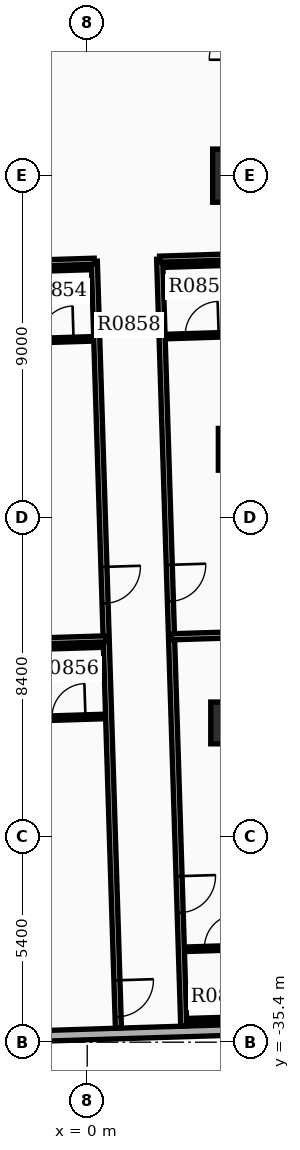
"""IFC4 building model, lengths in metres.
Left out: names, types, materials, properties, quantities, classifications, styles, units other than length and angle.
Written with IfcOpenShell. Run it as: python <this file> out.ifc"""

import sys

from ifc_helpers import new_model, si_unit, direction, frame, frame_2d, origin, origin_2d, place, context, subcontext, project, spatial, rectangle, extrude, element, fill, save


model = new_model("IFC4")
c1 = context("Model", 3, precision=1e-05, world=origin(), true_north=direction((0.0, 1.0)))
c2 = subcontext(c1, "Body", "Model", "MODEL_VIEW")
j1 = project(units=[si_unit("LENGTHUNIT", "METRE"), si_unit("PLANEANGLEUNIT", "RADIAN")], contexts=[c1])
p1 = place(None, origin())
s1 = spatial("IfcSite", under=j1, at=p1, CompositionType="ELEMENT")
p2 = place(p1, origin())
s2 = spatial("IfcBuilding", under=s1, at=p2, CompositionType="ELEMENT")
p3 = place(p2, frame((0.0, 0.0, 56.1)))
s3 = spatial("IfcBuildingStorey", under=s2, at=p3, CompositionType="ELEMENT", Elevation=56.1)
p4 = place(p3, frame((4.0, -12.6, 0.0), z_axis=(0.0, 0.0, 1.0), x_axis=(1.0, 0.0, 0.0)))
e1 = element("IfcColumn", 1, at=p4, inside=s3, PredefinedType="COLUMN", context=c2, shape_type="SweptSolid", body=[
    extrude(rectangle(XDim=1.4, YDim=1.4, at=origin_2d()), origin(), (0.0, 0.0, 1.0), 3.9),
])
for number, where, z_axis, x_axis in (
    (2, (4.0, -19.8, 0.0), (0.0, 0.0, 1.0), (1.0, 0.0, 0.0)),
    (3, (3.8, -27.0, 0.0), (0.0, 0.0, 1.0), (1.0, 0.0, 0.0)),
):
    element("IfcColumn", number, at=place(p3, frame(where, z_axis=z_axis, x_axis=x_axis)), inside=s3, PredefinedType="COLUMN", context=c2, shape_type="SweptSolid", body=[
        extrude(rectangle(XDim=1.1, YDim=1.1, at=origin_2d()), origin(), (0.0, 0.0, 1.0), 3.9),
    ])
p5 = place(p3, frame((-5.752, -35.378, 0.0), z_axis=(0.0, 0.0, 1.0), x_axis=(0.999506679556, 0.031406966164, 0.0)))
e4 = element("IfcWall", 4, at=p5, inside=s3, PredefinedType="STANDARD", context=c2, shape_type="SweptSolid", body=[
    extrude(rectangle(XDim=13.72, YDim=0.28, at=frame_2d((6.86, 0.0))), origin(), (0.0, 0.0, 1.0), 2.91),
])
p6 = place(p5, frame((0.85, 0.0, 0.85)))
e5 = element("IfcOpeningElement", 5, at=p6, cuts=e4, PredefinedType="OPENING", context=c2, shape_type="SweptSolid", body=[
    extrude(rectangle(XDim=1.0, YDim=1.5, at=frame_2d((0.5, 0.75))), frame((0.0, 0.15, 0.0), z_axis=(0.0, -1.0, 0.0), x_axis=(1.0, 0.0, 0.0)), (0.0, 0.0, 1.0), 0.3),
])
p7 = place(p3, frame((1.906, -14.797, 0.0), z_axis=(0.0, 0.0, 1.0), x_axis=(0.031415650687, -0.999506406629, 0.0)))
e6 = element("IfcWall", 6, at=p7, inside=s3, PredefinedType="PARTITIONING", context=c2, shape_type="SweptSolid", body=[
    extrude(rectangle(XDim=20.182, YDim=0.16, at=frame_2d((10.091, 0.0))), origin(), (0.0, 0.0, 1.0), 2.9),
])
p8 = place(p7, frame((8.047, 0.0, 0.0)))
e7 = element("IfcOpeningElement", 7, at=p8, cuts=e6, PredefinedType="OPENING", context=c2, shape_type="SweptSolid", body=[
    extrude(rectangle(XDim=0.96, YDim=2.15, at=frame_2d((0.48, 1.075))), frame((0.0, 0.09, 0.0), z_axis=(0.0, -1.0, 0.0), x_axis=(1.0, 0.0, 0.0)), (0.0, 0.0, 1.0), 0.18),
])
p9 = place(p7, frame((16.243, 0.0, 0.0)))
e8 = element("IfcOpeningElement", 8, at=p9, cuts=e6, PredefinedType="OPENING", context=c2, shape_type="SweptSolid", body=[
    extrude(rectangle(XDim=0.96, YDim=2.15, at=frame_2d((0.48, 1.075))), frame((0.0, 0.09, 0.0), z_axis=(0.0, -1.0, 0.0), x_axis=(1.0, 0.0, 0.0)), (0.0, 0.0, 1.0), 0.18),
])
p10 = place(p3, frame((1.906, -14.797, 0.0), z_axis=(0.0, 0.0, 1.0), x_axis=(0.99950701053, 0.031396431354, 0.0)))
e9 = element("IfcWall", 9, at=p10, inside=s3, PredefinedType="PARTITIONING", context=c2, shape_type="SweptSolid", body=[
    extrude(rectangle(XDim=5.28, YDim=0.16, at=frame_2d((2.64, 0.0))), origin(), (0.0, 0.0, 1.0), 2.9),
])
p11 = place(p3, frame((2.218, -24.733, 0.0), z_axis=(0.0, 0.0, 1.0), x_axis=(0.999506957349, 0.031398124315, 0.0)))
e10 = element("IfcWall", 10, at=p11, inside=s3, PredefinedType="PARTITIONING", context=c2, shape_type="SweptSolid", body=[
    extrude(rectangle(XDim=5.132, YDim=0.16, at=frame_2d((2.566, 0.0))), origin(), (0.0, 0.0, 1.0), 2.9),
])
p12 = place(p3, frame((2.11, -16.832, 0.0), z_axis=(0.0, 0.0, 1.0), x_axis=(0.999507353951, 0.031385496622, 0.0)))
e11 = element("IfcWall", 11, at=p12, inside=s3, PredefinedType="PARTITIONING", context=c2, shape_type="SweptSolid", body=[
    extrude(rectangle(XDim=1.82, YDim=0.12, at=frame_2d((0.91, 0.0))), origin(), (0.0, 0.0, 1.0), 2.9),
])
p13 = place(p12, frame((0.47, 0.0, 0.0)))
e12 = element("IfcOpeningElement", 12, at=p13, cuts=e11, PredefinedType="OPENING", context=c2, shape_type="SweptSolid", body=[
    extrude(rectangle(XDim=0.88, YDim=2.1, at=frame_2d((0.44, 1.05))), frame((0.0, 0.07, 0.0), z_axis=(0.0, -1.0, 0.0), x_axis=(1.0, 0.0, 0.0)), (0.0, 0.0, 1.0), 0.14),
])
p14 = place(p3, frame((2.051, -14.953, 0.0), z_axis=(0.0, 0.0, 1.0), x_axis=(0.999507221803, 0.031389704724, 0.0)))
e13 = element("IfcWall", 13, at=p14, inside=s3, PredefinedType="PARTITIONING", context=c2, shape_type="SweptSolid", body=[
    extrude(rectangle(XDim=1.82, YDim=0.12, at=frame_2d((0.91, 0.0))), origin(), (0.0, 0.0, 1.0), 2.9),
])
p15 = place(p3, frame((2.616, -32.954, 0.0), z_axis=(0.0, 0.0, 1.0), x_axis=(0.999507221803, 0.031389704724, 0.0)))
e14 = element("IfcWall", 14, at=p15, inside=s3, PredefinedType="PARTITIONING", context=c2, shape_type="SweptSolid", body=[
    extrude(rectangle(XDim=1.82, YDim=0.12, at=frame_2d((0.91, 0.0))), origin(), (0.0, 0.0, 1.0), 2.9),
])
p16 = place(p15, frame((0.47, 0.0, 0.0)))
e15 = element("IfcOpeningElement", 15, at=p16, cuts=e14, PredefinedType="OPENING", context=c2, shape_type="SweptSolid", body=[
    extrude(rectangle(XDim=0.88, YDim=2.1, at=frame_2d((0.44, 1.05))), frame((0.0, 0.07, 0.0), z_axis=(0.0, -1.0, 0.0), x_axis=(1.0, 0.0, 0.0)), (0.0, 0.0, 1.0), 0.14),
])
p17 = place(p3, frame((2.676, -34.833, 0.0), z_axis=(0.0, 0.0, 1.0), x_axis=(0.999507221803, 0.031389704724, 0.0)))
e16 = element("IfcWall", 16, at=p17, inside=s3, PredefinedType="PARTITIONING", context=c2, shape_type="SweptSolid", body=[
    extrude(rectangle(XDim=1.82, YDim=0.12, at=frame_2d((0.91, 0.0))), origin(), (0.0, 0.0, 1.0), 2.9),
])
p18 = place(p3, frame((0.187, -14.852, 0.0), z_axis=(0.0, 0.0, 1.0), x_axis=(0.031416030536, -0.99950639469, 0.0)))
e17 = element("IfcWall", 17, at=p18, inside=s3, PredefinedType="PARTITIONING", context=c2, shape_type="SweptSolid", body=[
    extrude(rectangle(XDim=20.182, YDim=0.16, at=frame_2d((10.091, 0.0))), origin(), (0.0, 0.0, 1.0), 2.9),
])
p19 = place(p18, frame((8.047, 0.0, 0.0)))
e18 = element("IfcOpeningElement", 18, at=p19, cuts=e17, PredefinedType="OPENING", context=c2, shape_type="SweptSolid", body=[
    extrude(rectangle(XDim=0.96, YDim=2.15, at=frame_2d((0.48, 1.075))), frame((0.0, 0.09, 0.0), z_axis=(0.0, -1.0, 0.0), x_axis=(1.0, 0.0, 0.0)), (0.0, 0.0, 1.0), 0.18),
])
p20 = place(p18, frame((18.93, 0.0, 0.0)))
e19 = element("IfcOpeningElement", 19, at=p20, cuts=e17, PredefinedType="OPENING", context=c2, shape_type="SweptSolid", body=[
    extrude(rectangle(XDim=0.96, YDim=2.15, at=frame_2d((0.48, 1.075))), frame((0.0, 0.09, 0.0), z_axis=(0.0, -1.0, 0.0), x_axis=(1.0, 0.0, 0.0)), (0.0, 0.0, 1.0), 0.18),
])
p21 = place(p3, frame((0.187, -14.852, 0.0), z_axis=(0.0, 0.0, 1.0), x_axis=(-0.99950721893, -0.031389796217, 0.0)))
e20 = element("IfcWall", 20, at=p21, inside=s3, PredefinedType="PARTITIONING", context=c2, shape_type="SweptSolid", body=[
    extrude(rectangle(XDim=6.44, YDim=0.16, at=frame_2d((3.22, 0.0))), origin(), (0.0, 0.0, 1.0), 2.9),
])
p22 = place(p3, frame((0.499, -24.788, 0.0), z_axis=(0.0, 0.0, 1.0), x_axis=(-0.999507180466, -0.031391020963, 0.0)))
e21 = element("IfcWall", 21, at=p22, inside=s3, PredefinedType="PARTITIONING", context=c2, shape_type="SweptSolid", body=[
    extrude(rectangle(XDim=6.292, YDim=0.16, at=frame_2d((3.146, 0.0))), origin(), (0.0, 0.0, 1.0), 2.9),
])
p23 = place(p3, frame((-1.708, -16.952, 0.0), z_axis=(0.0, 0.0, 1.0), x_axis=(0.999511421504, 0.031255692016, 0.0)))
e22 = element("IfcWall", 22, at=p23, inside=s3, PredefinedType="PARTITIONING", context=c2, shape_type="SweptSolid", body=[
    extrude(rectangle(XDim=1.82, YDim=0.12, at=frame_2d((0.91, 0.0))), origin(), (0.0, 0.0, 1.0), 2.9),
])
p24 = place(p23, frame((0.47, 0.0, 0.0)))
e23 = element("IfcOpeningElement", 23, at=p24, cuts=e22, PredefinedType="OPENING", context=c2, shape_type="SweptSolid", body=[
    extrude(rectangle(XDim=0.88, YDim=2.1, at=frame_2d((0.44, 1.05))), frame((0.0, 0.07, 0.0), z_axis=(0.0, -1.0, 0.0), x_axis=(1.0, 0.0, 0.0)), (0.0, 0.0, 1.0), 0.14),
])
p25 = place(p3, frame((-1.767, -15.073, 0.0), z_axis=(0.0, 0.0, 1.0), x_axis=(0.999507221803, 0.031389704724, 0.0)))
e24 = element("IfcWall", 24, at=p25, inside=s3, PredefinedType="PARTITIONING", context=c2, shape_type="SweptSolid", body=[
    extrude(rectangle(XDim=1.82, YDim=0.12, at=frame_2d((0.91, 0.0))), origin(), (0.0, 0.0, 1.0), 2.9),
])
p26 = place(p3, frame((-1.396, -26.888, 0.0), z_axis=(0.0, 0.0, 1.0), x_axis=(0.999507221803, 0.031389704724, 0.0)))
e25 = element("IfcWall", 25, at=p26, inside=s3, PredefinedType="PARTITIONING", context=c2, shape_type="SweptSolid", body=[
    extrude(rectangle(XDim=1.82, YDim=0.12, at=frame_2d((0.91, 0.0))), origin(), (0.0, 0.0, 1.0), 2.9),
])
p27 = place(p26, frame((0.47, 0.0, 0.0)))
e26 = element("IfcOpeningElement", 26, at=p27, cuts=e25, PredefinedType="OPENING", context=c2, shape_type="SweptSolid", body=[
    extrude(rectangle(XDim=0.88, YDim=2.1, at=frame_2d((0.44, 1.05))), frame((0.0, 0.07, 0.0), z_axis=(0.0, -1.0, 0.0), x_axis=(1.0, 0.0, 0.0)), (0.0, 0.0, 1.0), 0.14),
])
p28 = place(p3, frame((-1.455, -25.009, 0.0), z_axis=(0.0, 0.0, 1.0), x_axis=(0.999507221803, 0.031389704724, 0.0)))
e27 = element("IfcWall", 27, at=p28, inside=s3, PredefinedType="PARTITIONING", context=c2, shape_type="SweptSolid", body=[
    extrude(rectangle(XDim=1.82, YDim=0.12, at=frame_2d((0.91, 0.0))), origin(), (0.0, 0.0, 1.0), 2.9),
])
p29 = place(p8, origin())
e28 = element("IfcDoor", 28, at=p29, inside=s3, OperationType="SINGLE_SWING_LEFT", PredefinedType="DOOR", context=c2, shape_type="SweptSolid", body=[
    extrude(rectangle(XDim=0.96, YDim=2.15, at=frame_2d((0.48, 1.075))), frame((0.0, 0.025, 0.0), z_axis=(0.0, -1.0, 0.0), x_axis=(1.0, 0.0, 0.0)), (0.0, 0.0, 1.0), 0.05),
])
fill(e7, e28)
p30 = place(p13, origin())
e29 = element("IfcDoor", 29, at=p30, inside=s3, OperationType="SINGLE_SWING_RIGHT", PredefinedType="DOOR", context=c2, shape_type="SweptSolid", body=[
    extrude(rectangle(XDim=0.88, YDim=2.1, at=frame_2d((0.44, 1.05))), frame((0.0, 0.025, 0.0), z_axis=(0.0, -1.0, 0.0), x_axis=(1.0, 0.0, 0.0)), (0.0, 0.0, 1.0), 0.05),
])
fill(e12, e29)
p31 = place(p9, origin())
e30 = element("IfcDoor", 30, at=p31, inside=s3, OperationType="SINGLE_SWING_LEFT", PredefinedType="DOOR", context=c2, shape_type="SweptSolid", body=[
    extrude(rectangle(XDim=0.96, YDim=2.15, at=frame_2d((0.48, 1.075))), frame((0.0, 0.025, 0.0), z_axis=(0.0, -1.0, 0.0), x_axis=(1.0, 0.0, 0.0)), (0.0, 0.0, 1.0), 0.05),
])
fill(e8, e30)
p32 = place(p16, origin())
e31 = element("IfcDoor", 31, at=p32, inside=s3, OperationType="SINGLE_SWING_RIGHT", PredefinedType="DOOR", context=c2, shape_type="SweptSolid", body=[
    extrude(rectangle(XDim=0.88, YDim=2.1, at=frame_2d((0.44, 1.05))), frame((0.0, 0.025, 0.0), z_axis=(0.0, -1.0, 0.0), x_axis=(1.0, 0.0, 0.0)), (0.0, 0.0, 1.0), 0.05),
])
fill(e15, e31)
p33 = place(p19, origin())
e32 = element("IfcDoor", 32, at=p33, inside=s3, OperationType="SINGLE_SWING_LEFT", PredefinedType="DOOR", context=c2, shape_type="SweptSolid", body=[
    extrude(rectangle(XDim=0.96, YDim=2.15, at=frame_2d((0.48, 1.075))), frame((0.0, 0.025, 0.0), z_axis=(0.0, -1.0, 0.0), x_axis=(1.0, 0.0, 0.0)), (0.0, 0.0, 1.0), 0.05),
])
fill(e18, e32)
p34 = place(p24, origin())
e33 = element("IfcDoor", 33, at=p34, inside=s3, OperationType="SINGLE_SWING_RIGHT", PredefinedType="DOOR", context=c2, shape_type="SweptSolid", body=[
    extrude(rectangle(XDim=0.88, YDim=2.1, at=frame_2d((0.44, 1.05))), frame((0.0, 0.025, 0.0), z_axis=(0.0, -1.0, 0.0), x_axis=(1.0, 0.0, 0.0)), (0.0, 0.0, 1.0), 0.05),
])
fill(e23, e33)
p35 = place(p20, origin())
e34 = element("IfcDoor", 34, at=p35, inside=s3, OperationType="SINGLE_SWING_LEFT", PredefinedType="DOOR", context=c2, shape_type="SweptSolid", body=[
    extrude(rectangle(XDim=0.96, YDim=2.15, at=frame_2d((0.48, 1.075))), frame((0.0, 0.025, 0.0), z_axis=(0.0, -1.0, 0.0), x_axis=(1.0, 0.0, 0.0)), (0.0, 0.0, 1.0), 0.05),
])
fill(e19, e34)
p36 = place(p27, origin())
e35 = element("IfcDoor", 35, at=p36, inside=s3, OperationType="SINGLE_SWING_RIGHT", PredefinedType="DOOR", context=c2, shape_type="SweptSolid", body=[
    extrude(rectangle(XDim=0.88, YDim=2.1, at=frame_2d((0.44, 1.05))), frame((0.0, 0.025, 0.0), z_axis=(0.0, -1.0, 0.0), x_axis=(1.0, 0.0, 0.0)), (0.0, 0.0, 1.0), 0.05),
])
fill(e26, e35)
save(model, sys.argv[1])
